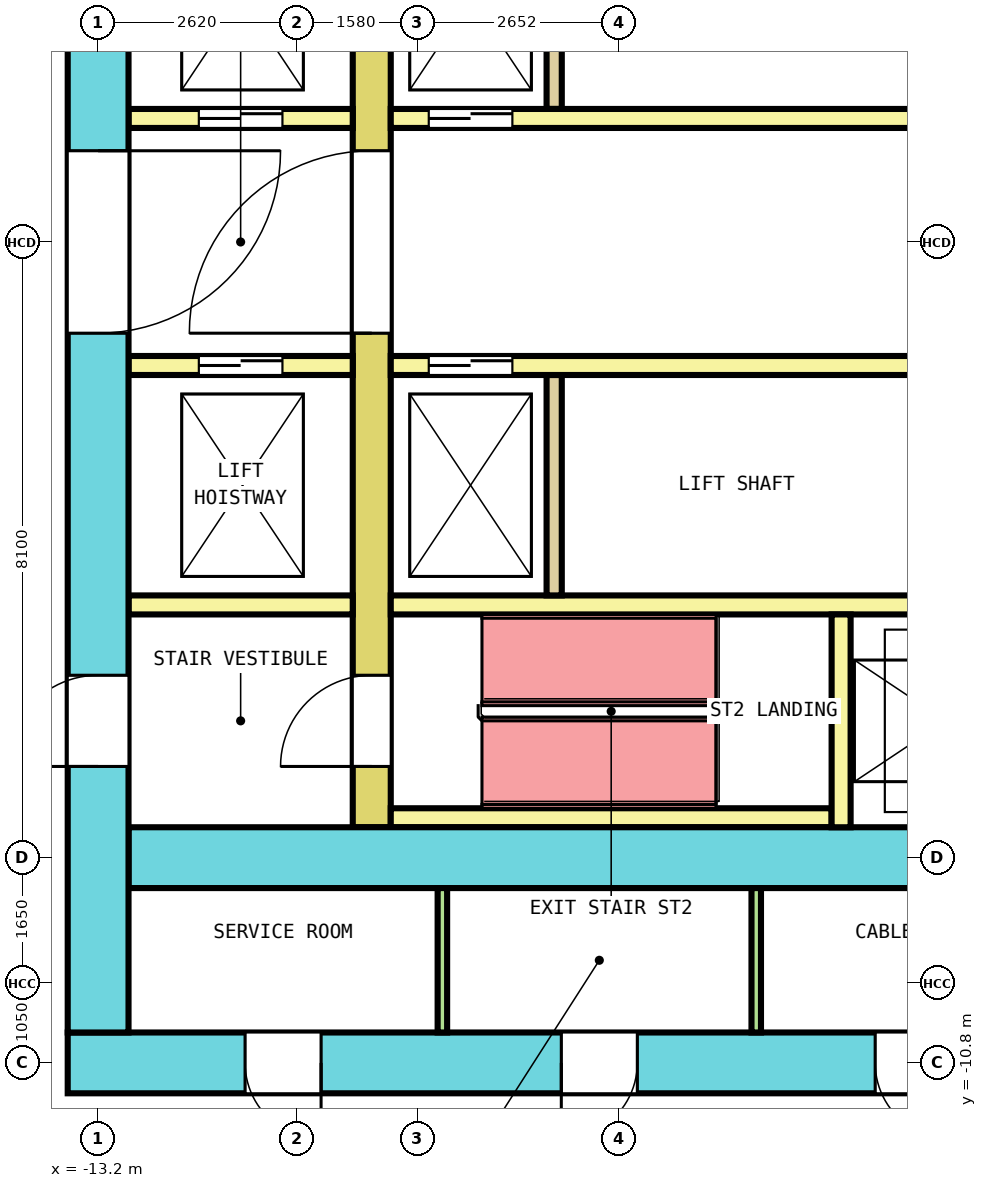
"""IFC4 building model, lengths in metres.
Left out: names, types, materials, properties, quantities, classifications, styles, units other than length and angle.
Written with IfcOpenShell. Run it as: python <this file> out.ifc"""

import sys

from ifc_helpers import new_model, si_unit, direction, frame, frame_2d, origin, place, context, subcontext, project, spatial, rectangle, extrude, element, fill, save


model = new_model("IFC4")
c1 = context("Model", 3, precision=1e-05, world=origin(), true_north=direction((0.0, 1.0)))
c2 = subcontext(c1, "Body", "Model", "MODEL_VIEW")
j1 = project(units=[si_unit("LENGTHUNIT", "METRE"), si_unit("PLANEANGLEUNIT", "RADIAN")], contexts=[c1])
p1 = place(None, origin())
s1 = spatial("IfcSite", under=j1, at=p1, CompositionType="ELEMENT")
p2 = place(p1, origin())
s2 = spatial("IfcBuilding", under=s1, at=p2, CompositionType="ELEMENT")
p3 = place(p2, frame((0.0, 0.0, 98.4)))
s3 = spatial("IfcBuildingStorey", under=s2, at=p3, CompositionType="ELEMENT", Elevation=98.4)
p4 = place(p3, frame((-13.6, -10.8, 0.0), z_axis=(0.0, 0.0, 1.0), x_axis=(1.0, 0.0, 0.0)))
e1 = element("IfcWall", 1, at=p4, inside=s3, PredefinedType="SHEAR", context=c2, shape_type="SweptSolid", body=[
    extrude(rectangle(XDim=27.2, YDim=0.8, at=frame_2d((13.6, 0.0))), origin(), (0.0, 0.0, 1.0), 4.1),
])
p5 = place(p4, frame((2.333, 0.0, 0.0)))
e2 = element("IfcOpeningElement", 2, at=p5, cuts=e1, PredefinedType="OPENING", context=c2, shape_type="SweptSolid", body=[
    extrude(rectangle(XDim=1.0, YDim=2.1, at=frame_2d((0.5, 1.05))), frame((0.0, 0.41, 0.0), z_axis=(0.0, -1.0, 0.0), x_axis=(1.0, 0.0, 0.0)), (0.0, 0.0, 1.0), 0.82),
])
p6 = place(p4, frame((6.494, 0.0, 0.0)))
e3 = element("IfcOpeningElement", 3, at=p6, cuts=e1, PredefinedType="OPENING", context=c2, shape_type="SweptSolid", body=[
    extrude(rectangle(XDim=1.0, YDim=2.1, at=frame_2d((0.5, 1.05))), frame((0.0, 0.41, 0.0), z_axis=(0.0, -1.0, 0.0), x_axis=(1.0, 0.0, 0.0)), (0.0, 0.0, 1.0), 0.82),
])
p7 = place(p4, frame((10.623, 0.0, 0.0)))
e4 = element("IfcOpeningElement", 4, at=p7, cuts=e1, PredefinedType="OPENING", context=c2, shape_type="SweptSolid", body=[
    extrude(rectangle(XDim=1.0, YDim=2.1, at=frame_2d((0.5, 1.05))), frame((0.0, 0.41, 0.0), z_axis=(0.0, -1.0, 0.0), x_axis=(1.0, 0.0, 0.0)), (0.0, 0.0, 1.0), 0.82),
])
p8 = place(p4, frame((19.16, 0.0, 0.0)))
e5 = element("IfcOpeningElement", 5, at=p8, cuts=e1, PredefinedType="OPENING", context=c2, shape_type="SweptSolid", body=[
    extrude(rectangle(XDim=1.0, YDim=2.1, at=frame_2d((0.5, 1.05))), frame((0.0, 0.41, 0.0), z_axis=(0.0, -1.0, 0.0), x_axis=(1.0, 0.0, 0.0)), (0.0, 0.0, 1.0), 0.82),
])
p9 = place(p4, frame((21.856, 0.0, 0.0)))
e6 = element("IfcOpeningElement", 6, at=p9, cuts=e1, PredefinedType="OPENING", context=c2, shape_type="SweptSolid", body=[
    extrude(rectangle(XDim=1.0, YDim=2.1, at=frame_2d((0.5, 1.05))), frame((0.0, 0.41, 0.0), z_axis=(0.0, -1.0, 0.0), x_axis=(1.0, 0.0, 0.0)), (0.0, 0.0, 1.0), 0.82),
])
p10 = place(p4, frame((24.583, 0.0, 0.0)))
e7 = element("IfcOpeningElement", 7, at=p10, cuts=e1, PredefinedType="OPENING", context=c2, shape_type="SweptSolid", body=[
    extrude(rectangle(XDim=1.0, YDim=2.1, at=frame_2d((0.5, 1.05))), frame((0.0, 0.41, 0.0), z_axis=(0.0, -1.0, 0.0), x_axis=(1.0, 0.0, 0.0)), (0.0, 0.0, 1.0), 0.82),
])
p11 = place(p4, frame((15.15, 0.0, 0.0)))
e8 = element("IfcOpeningElement", 8, at=p11, cuts=e1, PredefinedType="OPENING", context=c2, shape_type="SweptSolid", body=[
    extrude(rectangle(XDim=1.2, YDim=2.1, at=frame_2d((0.6, 1.05))), frame((0.0, 0.41, 0.0), z_axis=(0.0, -1.0, 0.0), x_axis=(1.0, 0.0, 0.0)), (0.0, 0.0, 1.0), 0.82),
])
p12 = place(p3, frame((-13.2, -10.4, 0.0), z_axis=(0.0, 0.0, 1.0), x_axis=(0.0, 1.0, 0.0)))
e9 = element("IfcWall", 9, at=p12, inside=s3, PredefinedType="SHEAR", context=c2, shape_type="SweptSolid", body=[
    extrude(rectangle(XDim=20.8, YDim=0.8, at=frame_2d((10.4, 0.0))), origin(), (0.0, 0.0, 1.0), 4.1),
])
p13 = place(p12, frame((9.2, 0.0, 0.0)))
e10 = element("IfcOpeningElement", 10, at=p13, cuts=e9, PredefinedType="OPENING", context=c2, shape_type="SweptSolid", body=[
    extrude(rectangle(XDim=2.4, YDim=2.1, at=frame_2d((1.2, 1.05))), frame((0.0, 0.41, 0.0), z_axis=(0.0, -1.0, 0.0), x_axis=(1.0, 0.0, 0.0)), (0.0, 0.0, 1.0), 0.82),
])
p14 = place(p12, frame((16.1, 0.0, 0.0)))
e11 = element("IfcOpeningElement", 11, at=p14, cuts=e9, PredefinedType="OPENING", context=c2, shape_type="SweptSolid", body=[
    extrude(rectangle(XDim=1.2, YDim=2.1, at=frame_2d((0.6, 1.05))), frame((0.0, 0.41, 0.0), z_axis=(0.0, -1.0, 0.0), x_axis=(1.0, 0.0, 0.0)), (0.0, 0.0, 1.0), 0.82),
])
p15 = place(p12, frame((3.5, 0.0, 0.0)))
e12 = element("IfcOpeningElement", 12, at=p15, cuts=e9, PredefinedType="OPENING", context=c2, shape_type="SweptSolid", body=[
    extrude(rectangle(XDim=1.2, YDim=2.1, at=frame_2d((0.6, 1.05))), frame((0.0, 0.41, 0.0), z_axis=(0.0, -1.0, 0.0), x_axis=(1.0, 0.0, 0.0)), (0.0, 0.0, 1.0), 0.82),
])
p16 = place(p3, frame((-12.8, -8.1, 0.0), z_axis=(0.0, 0.0, 1.0), x_axis=(1.0, 0.0, 0.0)))
e13 = element("IfcWall", 13, at=p16, inside=s3, PredefinedType="SHEAR", context=c2, shape_type="SweptSolid", body=[
    extrude(rectangle(XDim=25.6, YDim=0.8, at=frame_2d((12.8, 0.0))), origin(), (0.0, 0.0, 1.0), 4.1),
])
p17 = place(p16, frame((14.35, 0.0, 0.0)))
e14 = element("IfcOpeningElement", 14, at=p17, cuts=e13, PredefinedType="OPENING", context=c2, shape_type="SweptSolid", body=[
    extrude(rectangle(XDim=1.2, YDim=2.1, at=frame_2d((0.6, 1.05))), frame((0.0, 0.41, 0.0), z_axis=(0.0, -1.0, 0.0), x_axis=(1.0, 0.0, 0.0)), (0.0, 0.0, 1.0), 0.82),
])
p18 = place(p3, frame((-9.6, -7.7, 0.0), z_axis=(0.0, 0.0, 1.0), x_axis=(0.0, 1.0, 0.0)))
e15 = element("IfcWall", 15, at=p18, inside=s3, PredefinedType="SHEAR", context=c2, shape_type="SweptSolid", body=[
    extrude(rectangle(XDim=15.4, YDim=0.5, at=frame_2d((7.7, 0.0))), origin(), (0.0, 0.0, 1.0), 4.1),
])
p19 = place(p18, frame((6.5, 0.0, 0.0)))
e16 = element("IfcOpeningElement", 16, at=p19, cuts=e15, PredefinedType="OPENING", context=c2, shape_type="SweptSolid", body=[
    extrude(rectangle(XDim=2.4, YDim=2.1, at=frame_2d((1.2, 1.05))), frame((0.0, 0.26, 0.0), z_axis=(0.0, -1.0, 0.0), x_axis=(1.0, 0.0, 0.0)), (0.0, 0.0, 1.0), 0.52),
])
p20 = place(p18, frame((13.4, 0.0, 0.0)))
e17 = element("IfcOpeningElement", 17, at=p20, cuts=e15, PredefinedType="OPENING", context=c2, shape_type="SweptSolid", body=[
    extrude(rectangle(XDim=1.2, YDim=2.1, at=frame_2d((0.6, 1.05))), frame((0.0, 0.26, 0.0), z_axis=(0.0, -1.0, 0.0), x_axis=(1.0, 0.0, 0.0)), (0.0, 0.0, 1.0), 0.52),
])
p21 = place(p18, frame((0.8, 0.0, 0.0)))
e18 = element("IfcOpeningElement", 18, at=p21, cuts=e15, PredefinedType="OPENING", context=c2, shape_type="SweptSolid", body=[
    extrude(rectangle(XDim=1.2, YDim=2.1, at=frame_2d((0.6, 1.05))), frame((0.0, 0.26, 0.0), z_axis=(0.0, -1.0, 0.0), x_axis=(1.0, 0.0, 0.0)), (0.0, 0.0, 1.0), 0.52),
])
p22 = place(p3, frame((-12.8, 1.625, 0.0), z_axis=(0.0, 0.0, 1.0), x_axis=(1.0, 0.0, 0.0)))
e19 = element("IfcWall", 19, at=p22, inside=s3, PredefinedType="SOLIDWALL", context=c2, shape_type="SweptSolid", body=[
    extrude(rectangle(XDim=2.95, YDim=0.25, at=frame_2d((1.475, 0.0))), origin(), (0.0, 0.0, 1.0), 4.1),
])
p23 = place(p22, frame((0.925, 0.0, 0.0)))
e20 = element("IfcOpeningElement", 20, at=p23, cuts=e19, PredefinedType="OPENING", context=c2, shape_type="SweptSolid", body=[
    extrude(rectangle(XDim=1.1, YDim=2.1, at=frame_2d((0.55, 1.05))), frame((0.0, 0.135, 0.0), z_axis=(0.0, -1.0, 0.0), x_axis=(1.0, 0.0, 0.0)), (0.0, 0.0, 1.0), 0.27),
])
p24 = place(p3, frame((-9.35, 1.625, 0.0), z_axis=(0.0, 0.0, 1.0), x_axis=(1.0, 0.0, 0.0)))
e21 = element("IfcWall", 21, at=p24, inside=s3, PredefinedType="SOLIDWALL", context=c2, shape_type="SweptSolid", body=[
    extrude(rectangle(XDim=18.7, YDim=0.25, at=frame_2d((9.35, 0.0))), origin(), (0.0, 0.0, 1.0), 4.1),
])
p25 = place(p24, frame((0.5, 0.0, 0.0)))
e22 = element("IfcOpeningElement", 22, at=p25, cuts=e21, PredefinedType="OPENING", context=c2, shape_type="SweptSolid", body=[
    extrude(rectangle(XDim=1.1, YDim=2.1, at=frame_2d((0.55, 1.05))), frame((0.0, 0.135, 0.0), z_axis=(0.0, -1.0, 0.0), x_axis=(1.0, 0.0, 0.0)), (0.0, 0.0, 1.0), 0.27),
])
p26 = place(p24, frame((17.1, 0.0, 0.0)))
e23 = element("IfcOpeningElement", 23, at=p26, cuts=e21, PredefinedType="OPENING", context=c2, shape_type="SweptSolid", body=[
    extrude(rectangle(XDim=1.1, YDim=2.1, at=frame_2d((0.55, 1.05))), frame((0.0, 0.135, 0.0), z_axis=(0.0, -1.0, 0.0), x_axis=(1.0, 0.0, 0.0)), (0.0, 0.0, 1.0), 0.27),
])
p27 = place(p3, frame((-7.2, 1.75, 0.0), z_axis=(0.0, 0.0, 1.0), x_axis=(0.0, 1.0, 0.0)))
e24 = element("IfcWall", 24, at=p27, inside=s3, PredefinedType="SOLIDWALL", context=c2, shape_type="SweptSolid", body=[
    extrude(rectangle(XDim=2.9, YDim=0.2, at=frame_2d((1.45, 0.0))), origin(), (0.0, 0.0, 1.0), 4.1),
])
p28 = place(p3, frame((-12.8, -1.625, 0.0), z_axis=(0.0, 0.0, 1.0), x_axis=(1.0, 0.0, 0.0)))
e25 = element("IfcWall", 25, at=p28, inside=s3, PredefinedType="SOLIDWALL", context=c2, shape_type="SweptSolid", body=[
    extrude(rectangle(XDim=2.95, YDim=0.25, at=frame_2d((1.475, 0.0))), origin(), (0.0, 0.0, 1.0), 4.1),
])
p29 = place(p28, frame((0.925, 0.0, 0.0)))
e26 = element("IfcOpeningElement", 26, at=p29, cuts=e25, PredefinedType="OPENING", context=c2, shape_type="SweptSolid", body=[
    extrude(rectangle(XDim=1.1, YDim=2.1, at=frame_2d((0.55, 1.05))), frame((0.0, 0.135, 0.0), z_axis=(0.0, -1.0, 0.0), x_axis=(1.0, 0.0, 0.0)), (0.0, 0.0, 1.0), 0.27),
])
p30 = place(p3, frame((-9.35, -1.625, 0.0), z_axis=(0.0, 0.0, 1.0), x_axis=(1.0, 0.0, 0.0)))
e27 = element("IfcWall", 27, at=p30, inside=s3, PredefinedType="SOLIDWALL", context=c2, shape_type="SweptSolid", body=[
    extrude(rectangle(XDim=18.7, YDim=0.25, at=frame_2d((9.35, 0.0))), origin(), (0.0, 0.0, 1.0), 4.1),
])
p31 = place(p30, frame((0.5, 0.0, 0.0)))
e28 = element("IfcOpeningElement", 28, at=p31, cuts=e27, PredefinedType="OPENING", context=c2, shape_type="SweptSolid", body=[
    extrude(rectangle(XDim=1.1, YDim=2.1, at=frame_2d((0.55, 1.05))), frame((0.0, 0.135, 0.0), z_axis=(0.0, -1.0, 0.0), x_axis=(1.0, 0.0, 0.0)), (0.0, 0.0, 1.0), 0.27),
])
p32 = place(p30, frame((17.1, 0.0, 0.0)))
e29 = element("IfcOpeningElement", 29, at=p32, cuts=e27, PredefinedType="OPENING", context=c2, shape_type="SweptSolid", body=[
    extrude(rectangle(XDim=1.1, YDim=2.1, at=frame_2d((0.55, 1.05))), frame((0.0, 0.135, 0.0), z_axis=(0.0, -1.0, 0.0), x_axis=(1.0, 0.0, 0.0)), (0.0, 0.0, 1.0), 0.27),
])
p33 = place(p3, frame((-12.8, -4.775, 0.0), z_axis=(0.0, 0.0, 1.0), x_axis=(1.0, 0.0, 0.0)))
e30 = element("IfcWall", 30, at=p33, inside=s3, PredefinedType="SOLIDWALL", context=c2, shape_type="SweptSolid", body=[
    extrude(rectangle(XDim=2.95, YDim=0.25, at=frame_2d((1.475, 0.0))), origin(), (0.0, 0.0, 1.0), 4.1),
])
p34 = place(p3, frame((-9.35, -4.775, 0.0), z_axis=(0.0, 0.0, 1.0), x_axis=(1.0, 0.0, 0.0)))
e31 = element("IfcWall", 31, at=p34, inside=s3, PredefinedType="SOLIDWALL", context=c2, shape_type="SweptSolid", body=[
    extrude(rectangle(XDim=18.7, YDim=0.25, at=frame_2d((9.35, 0.0))), origin(), (0.0, 0.0, 1.0), 4.1),
])
p35 = place(p3, frame((-7.2, -4.65, 0.0), z_axis=(0.0, 0.0, 1.0), x_axis=(0.0, 1.0, 0.0)))
e32 = element("IfcWall", 32, at=p35, inside=s3, PredefinedType="SOLIDWALL", context=c2, shape_type="SweptSolid", body=[
    extrude(rectangle(XDim=2.9, YDim=0.2, at=frame_2d((1.45, 0.0))), origin(), (0.0, 0.0, 1.0), 4.1),
])
p36 = place(p3, frame((-9.35, -7.575, 0.0), z_axis=(0.0, 0.0, 1.0), x_axis=(1.0, 0.0, 0.0)))
e33 = element("IfcWall", 33, at=p36, inside=s3, PredefinedType="SOLIDWALL", context=c2, shape_type="SweptSolid", body=[
    extrude(rectangle(XDim=5.8, YDim=0.25, at=frame_2d((2.9, 0.0))), origin(), (0.0, 0.0, 1.0), 4.1),
])
p37 = place(p3, frame((-3.425, -7.7, 0.0), z_axis=(0.0, 0.0, 1.0), x_axis=(0.0, 1.0, 0.0)))
e34 = element("IfcWall", 34, at=p37, inside=s3, PredefinedType="SOLIDWALL", context=c2, shape_type="SweptSolid", body=[
    extrude(rectangle(XDim=2.8, YDim=0.25, at=frame_2d((1.4, 0.0))), origin(), (0.0, 0.0, 1.0), 4.1),
])
for number, where, z_axis, x_axis in (
    (35, (-8.671, -10.4, 0.0), (0.0, 0.0, 1.0), (0.0, 1.0, 0.0)),
    (36, (-4.542, -10.4, 0.0), (0.0, 0.0, 1.0), (0.0, 1.0, 0.0)),
):
    element("IfcWall", number, at=place(p3, frame(where, z_axis=z_axis, x_axis=x_axis)), inside=s3, PredefinedType="PARTITIONING", context=c2, shape_type="SweptSolid", body=[
        extrude(rectangle(XDim=1.9, YDim=0.125, at=frame_2d((0.95, 0.0))), origin(), (0.0, 0.0, 1.0), 4.1),
    ])
p38 = place(p23, origin())
e37 = element("IfcDoor", 37, at=p38, inside=s3, OperationType="DOUBLE_DOOR_SLIDING", PredefinedType="DOOR", context=c2, shape_type="SweptSolid", body=[
    extrude(rectangle(XDim=1.1, YDim=2.1, at=frame_2d((0.55, 1.05))), frame((0.0, 0.075, 0.0), z_axis=(0.0, -1.0, 0.0), x_axis=(1.0, 0.0, 0.0)), (0.0, 0.0, 1.0), 0.15),
])
fill(e20, e37)
p39 = place(p25, origin())
e38 = element("IfcDoor", 38, at=p39, inside=s3, OperationType="DOUBLE_DOOR_SLIDING", PredefinedType="DOOR", context=c2, shape_type="SweptSolid", body=[
    extrude(rectangle(XDim=1.1, YDim=2.1, at=frame_2d((0.55, 1.05))), frame((0.0, 0.075, 0.0), z_axis=(0.0, -1.0, 0.0), x_axis=(1.0, 0.0, 0.0)), (0.0, 0.0, 1.0), 0.15),
])
fill(e22, e38)
p40 = place(p29, origin())
e39 = element("IfcDoor", 39, at=p40, inside=s3, OperationType="DOUBLE_DOOR_SLIDING", PredefinedType="DOOR", context=c2, shape_type="SweptSolid", body=[
    extrude(rectangle(XDim=1.1, YDim=2.1, at=frame_2d((0.55, 1.05))), frame((0.0, 0.075, 0.0), z_axis=(0.0, -1.0, 0.0), x_axis=(1.0, 0.0, 0.0)), (0.0, 0.0, 1.0), 0.15),
])
fill(e26, e39)
p41 = place(p31, origin())
e40 = element("IfcDoor", 40, at=p41, inside=s3, OperationType="DOUBLE_DOOR_SLIDING", PredefinedType="DOOR", context=c2, shape_type="SweptSolid", body=[
    extrude(rectangle(XDim=1.1, YDim=2.1, at=frame_2d((0.55, 1.05))), frame((0.0, 0.075, 0.0), z_axis=(0.0, -1.0, 0.0), x_axis=(1.0, 0.0, 0.0)), (0.0, 0.0, 1.0), 0.15),
])
fill(e28, e40)
p42 = place(p19, origin())
e41 = element("IfcDoor", 41, at=p42, inside=s3, OperationType="DOUBLE_DOOR_SINGLE_SWING", PredefinedType="DOOR", context=c2, shape_type="SweptSolid", body=[
    extrude(rectangle(XDim=2.4, YDim=2.1, at=frame_2d((1.2, 1.05))), frame((0.0, 0.2, 0.0), z_axis=(0.0, -1.0, 0.0), x_axis=(1.0, 0.0, 0.0)), (0.0, 0.0, 1.0), 0.4),
])
fill(e16, e41)
p43 = place(p13, origin())
e42 = element("IfcDoor", 42, at=p43, inside=s3, OperationType="DOUBLE_DOOR_SINGLE_SWING", PredefinedType="DOOR", context=c2, shape_type="SweptSolid", body=[
    extrude(rectangle(XDim=2.4, YDim=2.1, at=frame_2d((1.2, 1.05))), frame((0.0, 0.3, 0.0), z_axis=(0.0, -1.0, 0.0), x_axis=(1.0, 0.0, 0.0)), (0.0, 0.0, 1.0), 0.6),
])
fill(e10, e42)
p44 = place(p21, origin())
e43 = element("IfcDoor", 43, at=p44, inside=s3, OperationType="SINGLE_SWING_RIGHT", PredefinedType="DOOR", context=c2, shape_type="SweptSolid", body=[
    extrude(rectangle(XDim=1.2, YDim=2.1, at=frame_2d((0.6, 1.05))), frame((0.0, 0.2, 0.0), z_axis=(0.0, -1.0, 0.0), x_axis=(1.0, 0.0, 0.0)), (0.0, 0.0, 1.0), 0.4),
])
fill(e18, e43)
p45 = place(p15, origin())
e44 = element("IfcDoor", 44, at=p45, inside=s3, OperationType="SINGLE_SWING_LEFT", PredefinedType="DOOR", context=c2, shape_type="SweptSolid", body=[
    extrude(rectangle(XDim=1.2, YDim=2.1, at=frame_2d((0.6, 1.05))), frame((0.0, 0.3, 0.0), z_axis=(0.0, -1.0, 0.0), x_axis=(1.0, 0.0, 0.0)), (0.0, 0.0, 1.0), 0.6),
])
fill(e12, e44)
p46 = place(p5, origin())
e45 = element("IfcDoor", 45, at=p46, inside=s3, OperationType="SINGLE_SWING_RIGHT", PredefinedType="DOOR", context=c2, shape_type="SweptSolid", body=[
    extrude(rectangle(XDim=1.0, YDim=2.1, at=frame_2d((0.5, 1.05))), frame((0.0, 0.3, 0.0), z_axis=(0.0, -1.0, 0.0), x_axis=(1.0, 0.0, 0.0)), (0.0, 0.0, 1.0), 0.6),
])
fill(e2, e45)
p47 = place(p6, origin())
e46 = element("IfcDoor", 46, at=p47, inside=s3, OperationType="SINGLE_SWING_LEFT", PredefinedType="DOOR", context=c2, shape_type="SweptSolid", body=[
    extrude(rectangle(XDim=1.0, YDim=2.1, at=frame_2d((0.5, 1.05))), frame((0.0, 0.3, 0.0), z_axis=(0.0, -1.0, 0.0), x_axis=(1.0, 0.0, 0.0)), (0.0, 0.0, 1.0), 0.6),
])
fill(e3, e46)
p48 = place(p7, origin())
e47 = element("IfcDoor", 47, at=p48, inside=s3, OperationType="SINGLE_SWING_RIGHT", PredefinedType="DOOR", context=c2, shape_type="SweptSolid", body=[
    extrude(rectangle(XDim=1.0, YDim=2.1, at=frame_2d((0.5, 1.05))), frame((0.0, 0.3, 0.0), z_axis=(0.0, -1.0, 0.0), x_axis=(1.0, 0.0, 0.0)), (0.0, 0.0, 1.0), 0.6),
])
fill(e4, e47)
save(model, sys.argv[1])
